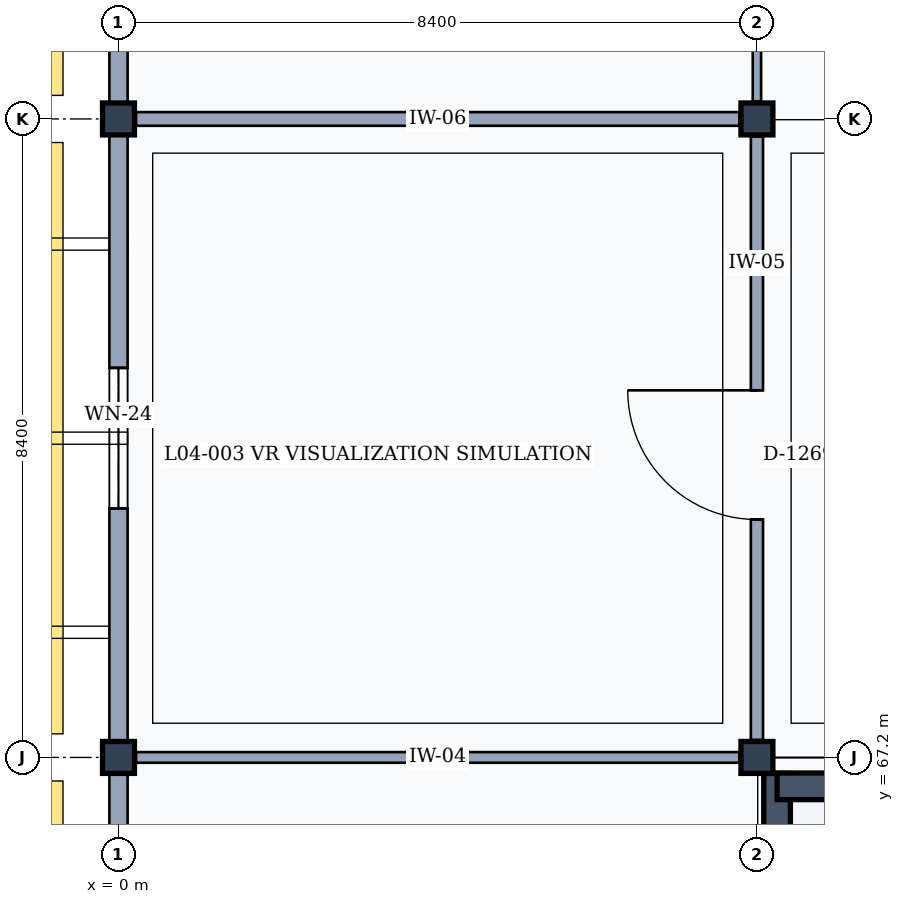
"""IFC4 building model, lengths in metres.
Left out: names, types, materials, properties, quantities, classifications, styles, units other than length and angle.
Written with IfcOpenShell. Run it as: python <this file> out.ifc"""

import sys

from ifc_helpers import new_model, si_unit, direction, frame, frame_2d, origin, origin_2d, place, context, subcontext, project, spatial, rectangle, extrude, element, fill, save


model = new_model("IFC4")
c1 = context("Model", 3, precision=1e-05, world=origin(), true_north=direction((0.0, 1.0)))
c2 = subcontext(c1, "Body", "Model", "MODEL_VIEW")
j1 = project(units=[si_unit("LENGTHUNIT", "METRE"), si_unit("PLANEANGLEUNIT", "RADIAN")], contexts=[c1])
p1 = place(None, origin())
s1 = spatial("IfcSite", under=j1, at=p1, CompositionType="ELEMENT")
p2 = place(p1, origin())
s2 = spatial("IfcBuilding", under=s1, at=p2, CompositionType="ELEMENT")
p3 = place(p2, frame((0.0, 0.0, 18.0)))
s3 = spatial("IfcBuildingStorey", under=s2, at=p3, CompositionType="ELEMENT", Elevation=18.0)
for number, where, z_axis, x_axis in (
    (1, (0.0, 67.2, 0.0), (0.0, 0.0, 1.0), (1.0, 0.0, 0.0)),
    (2, (0.0, 75.6, 0.0), (0.0, 0.0, 1.0), (1.0, 0.0, 0.0)),
    (3, (8.4, 67.2, 0.0), (0.0, 0.0, 1.0), (1.0, 0.0, 0.0)),
    (4, (8.4, 75.6, 0.0), (0.0, 0.0, 1.0), (1.0, 0.0, 0.0)),
):
    element("IfcColumn", number, at=place(p3, frame(where, z_axis=z_axis, x_axis=x_axis)), inside=s3, PredefinedType="COLUMN", context=c2, shape_type="SweptSolid", body=[
        extrude(rectangle(XDim=0.42, YDim=0.42, at=origin_2d()), origin(), (0.0, 0.0, 1.0), 4.2),
    ])
p4 = place(p3, frame((0.0, 59.01, 0.0), z_axis=(0.0, 0.0, 1.0), x_axis=(0.0, 1.0, 0.0)))
e5 = element("IfcWall", 5, at=p4, inside=s3, PredefinedType="SOLIDWALL", context=c2, shape_type="SweptSolid", body=[
    extrude(rectangle(XDim=7.98, YDim=0.24, at=frame_2d((3.99, 0.0))), origin(), (0.0, 0.0, 1.0), 3.36),
])
p5 = place(p4, frame((3.365, 0.0, 0.9)))
e6 = element("IfcOpeningElement", 6, at=p5, cuts=e5, PredefinedType="OPENING", context=c2, shape_type="SweptSolid", body=[
    extrude(rectangle(XDim=1.25, YDim=1.7, at=frame_2d((0.625, 0.85))), frame((0.0, 0.13, 0.0), z_axis=(0.0, -1.0, 0.0), x_axis=(1.0, 0.0, 0.0)), (0.0, 0.0, 1.0), 0.26),
])
p6 = place(p3, frame((0.0, 67.41, 0.0), z_axis=(0.0, 0.0, 1.0), x_axis=(0.0, 1.0, 0.0)))
e7 = element("IfcWall", 7, at=p6, inside=s3, PredefinedType="SOLIDWALL", context=c2, shape_type="SweptSolid", body=[
    extrude(rectangle(XDim=7.98, YDim=0.24, at=frame_2d((3.99, 0.0))), origin(), (0.0, 0.0, 1.0), 3.36),
])
p7 = place(p6, frame((3.065, 0.0, 0.9)))
e8 = element("IfcOpeningElement", 8, at=p7, cuts=e7, PredefinedType="OPENING", context=c2, shape_type="SweptSolid", body=[
    extrude(rectangle(XDim=1.85, YDim=1.65, at=frame_2d((0.925, 0.825))), frame((0.0, 0.13, 0.0), z_axis=(0.0, -1.0, 0.0), x_axis=(1.0, 0.0, 0.0)), (0.0, 0.0, 1.0), 0.26),
])
p8 = place(p3, frame((0.0, 75.81, 0.0), z_axis=(0.0, 0.0, 1.0), x_axis=(0.0, 1.0, 0.0)))
e9 = element("IfcWall", 9, at=p8, inside=s3, PredefinedType="SOLIDWALL", context=c2, shape_type="SweptSolid", body=[
    extrude(rectangle(XDim=7.98, YDim=0.24, at=frame_2d((3.99, 0.0))), origin(), (0.0, 0.0, 1.0), 3.36),
])
p9 = place(p8, frame((2.715, 0.0, 0.9)))
e10 = element("IfcOpeningElement", 10, at=p9, cuts=e9, PredefinedType="OPENING", context=c2, shape_type="SweptSolid", body=[
    extrude(rectangle(XDim=2.55, YDim=1.75, at=frame_2d((1.275, 0.875))), frame((0.0, 0.13, 0.0), z_axis=(0.0, -1.0, 0.0), x_axis=(1.0, 0.0, 0.0)), (0.0, 0.0, 1.0), 0.26),
])
p10 = place(p3, frame((8.665, 59.05, 0.0), z_axis=(0.0, 0.0, 1.0), x_axis=(0.0, 1.0, 0.0)))
e11 = element("IfcWall", 11, at=p10, inside=s3, PredefinedType="SHEAR", context=c2, shape_type="SweptSolid", body=[
    extrude(rectangle(XDim=7.94, YDim=0.35, at=frame_2d((3.97, 0.0))), origin(), (0.0, 0.0, 1.0), 3.98),
])
p11 = place(p3, frame((8.665, 66.82, 0.0), z_axis=(0.0, 0.0, 1.0), x_axis=(1.0, 0.0, 0.0)))
e12 = element("IfcWall", 12, at=p11, inside=s3, PredefinedType="SHEAR", context=c2, shape_type="SweptSolid", body=[
    extrude(rectangle(XDim=7.875, YDim=0.35, at=frame_2d((3.938, 0.0))), origin(), (0.0, 0.0, 1.0), 3.98),
])
p12 = place(p3, frame((0.23, 67.2, 0.0), z_axis=(0.0, 0.0, 1.0), x_axis=(1.0, 0.0, 0.0)))
e13 = element("IfcWall", 13, at=p12, inside=s3, PredefinedType="PARTITIONING", context=c2, shape_type="SweptSolid", body=[
    extrude(rectangle(XDim=7.94, YDim=0.14, at=frame_2d((3.97, 0.0))), origin(), (0.0, 0.0, 1.0), 3.32),
])
p13 = place(p3, frame((8.4, 67.43, 0.0), z_axis=(0.0, 0.0, 1.0), x_axis=(0.0, 1.0, 0.0)))
e14 = element("IfcWall", 14, at=p13, inside=s3, PredefinedType="PARTITIONING", context=c2, shape_type="SweptSolid", body=[
    extrude(rectangle(XDim=7.94, YDim=0.16, at=frame_2d((3.97, 0.0))), origin(), (0.0, 0.0, 1.0), 3.32),
])
p14 = place(p13, frame((2.9, 0.0, 0.0)))
e15 = element("IfcOpeningElement", 15, at=p14, cuts=e14, PredefinedType="OPENING", context=c2, shape_type="SweptSolid", body=[
    extrude(rectangle(XDim=1.7, YDim=2.3, at=frame_2d((0.85, 1.15))), frame((0.0, 0.09, 0.0), z_axis=(0.0, -1.0, 0.0), x_axis=(1.0, 0.0, 0.0)), (0.0, 0.0, 1.0), 0.18),
])
p15 = place(p3, frame((0.23, 75.6, 0.0), z_axis=(0.0, 0.0, 1.0), x_axis=(1.0, 0.0, 0.0)))
e16 = element("IfcWall", 16, at=p15, inside=s3, PredefinedType="PARTITIONING", context=c2, shape_type="SweptSolid", body=[
    extrude(rectangle(XDim=7.94, YDim=0.18, at=frame_2d((3.97, 0.0))), origin(), (0.0, 0.0, 1.0), 3.32),
])
p16 = place(p3, frame((8.4, 75.83, 0.0), z_axis=(0.0, 0.0, 1.0), x_axis=(0.0, 1.0, 0.0)))
e17 = element("IfcWall", 17, at=p16, inside=s3, PredefinedType="PARTITIONING", context=c2, shape_type="SweptSolid", body=[
    extrude(rectangle(XDim=7.94, YDim=0.11, at=frame_2d((3.97, 0.0))), origin(), (0.0, 0.0, 1.0), 3.32),
])
p17 = place(p16, frame((2.8, 0.0, 0.0)))
e18 = element("IfcOpeningElement", 18, at=p17, cuts=e17, PredefinedType="OPENING", context=c2, shape_type="SweptSolid", body=[
    extrude(rectangle(XDim=1.9, YDim=2.4, at=frame_2d((0.95, 1.2))), frame((0.0, 0.065, 0.0), z_axis=(0.0, -1.0, 0.0), x_axis=(1.0, 0.0, 0.0)), (0.0, 0.0, 1.0), 0.13),
])
p18 = place(p7, origin())
e19 = element("IfcWindow", 19, at=p18, inside=s3, PartitioningType="SINGLE_PANEL", PredefinedType="WINDOW", context=c2, shape_type="SweptSolid", body=[
    extrude(rectangle(XDim=1.85, YDim=1.65, at=frame_2d((0.925, 0.825))), frame((0.0, 0.03, 0.0), z_axis=(0.0, -1.0, 0.0), x_axis=(1.0, 0.0, 0.0)), (0.0, 0.0, 1.0), 0.06),
])
fill(e8, e19)
p19 = place(p14, origin())
e20 = element("IfcDoor", 20, at=p19, inside=s3, OperationType="SINGLE_SWING_RIGHT", PredefinedType="DOOR", context=c2, shape_type="SweptSolid", body=[
    extrude(rectangle(XDim=1.7, YDim=2.3, at=frame_2d((0.85, 1.15))), frame((0.0, 0.025, 0.0), z_axis=(0.0, -1.0, 0.0), x_axis=(1.0, 0.0, 0.0)), (0.0, 0.0, 1.0), 0.05),
])
fill(e15, e20)
save(model, sys.argv[1])
